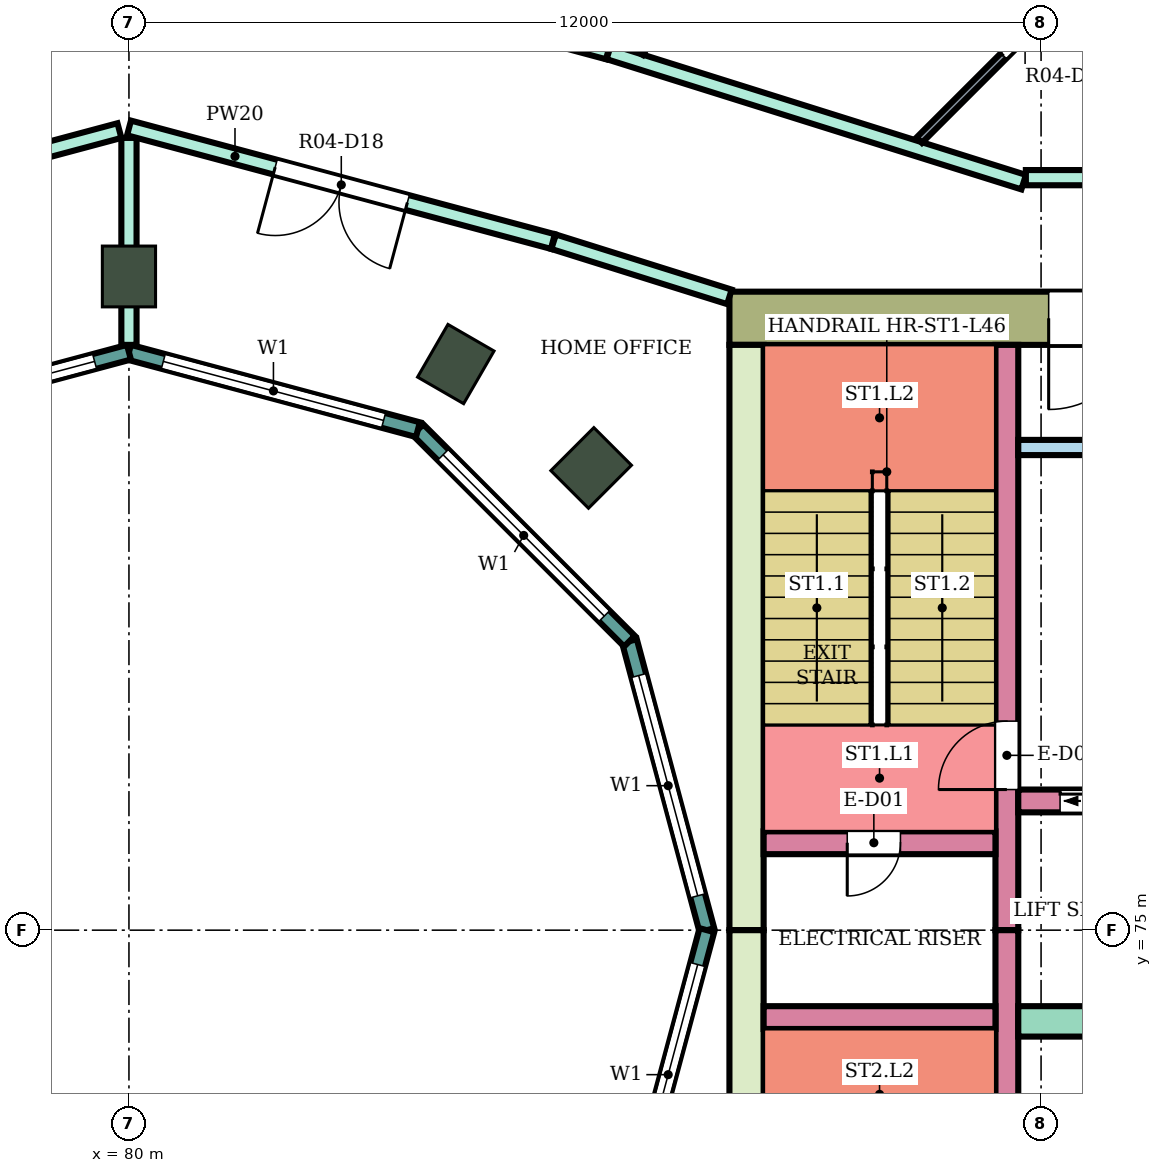
"""IFC4 building model, lengths in metres.
Left out: names, types, materials, properties, quantities, classifications, styles, units other than length and angle.
Written with IfcOpenShell. Run it as: python <this file> out.ifc"""

import sys

from ifc_helpers import new_model, si_unit, direction, frame, frame_2d, origin, origin_2d, place, context, subcontext, project, spatial, rectangle, extrude, element, fill, save


model = new_model("IFC4")
c1 = context("Model", 3, precision=1e-05, world=origin(), true_north=direction((0.0, 1.0)))
c2 = subcontext(c1, "Body", "Model", "MODEL_VIEW")
j1 = project(units=[si_unit("LENGTHUNIT", "METRE"), si_unit("PLANEANGLEUNIT", "RADIAN")], contexts=[c1])
p1 = place(None, origin())
s1 = spatial("IfcSite", under=j1, at=p1, CompositionType="ELEMENT")
p2 = place(p1, origin())
s2 = spatial("IfcBuilding", under=s1, at=p2, CompositionType="ELEMENT")
p3 = place(p2, frame((0.0, 0.0, 198.7)))
s3 = spatial("IfcBuildingStorey", under=s2, at=p3, CompositionType="ELEMENT", Elevation=198.7)
for number, where, z_axis, x_axis in (
    (1, (86.081, 81.081, 0.0), (0.0, 0.0, 1.0), (0.707, 0.707, 0.0)),
    (2, (84.3, 82.448, 0.0), (0.0, 0.0, 1.0), (0.5, 0.866, 0.0)),
    (3, (80.0, 83.6, 0.0), (0.0, 0.0, 1.0), (0.0, 1.0, 0.0)),
):
    element("IfcColumn", number, at=place(p3, frame(where, z_axis=z_axis, x_axis=x_axis)), inside=s3, PredefinedType="COLUMN", context=c2, shape_type="SweptSolid", body=[
        extrude(rectangle(XDim=0.8, YDim=0.7, at=origin_2d()), origin(), (0.0, 0.0, 1.0), 4.1),
    ])
p4 = place(p3, frame((87.9, 83.05, 0.0), z_axis=(0.0, 0.0, 1.0), x_axis=(1.0, 0.0, 0.0)))
e4 = element("IfcWall", 4, at=p4, inside=s3, PredefinedType="SHEAR", context=c2, shape_type="SweptSolid", body=[
    extrude(rectangle(XDim=14.8, YDim=0.7, at=frame_2d((7.4, 0.0))), origin(), (0.0, 0.0, 1.0), 3.78),
])
p5 = place(p4, frame((4.2, 0.0, 0.0)))
e5 = element("IfcOpeningElement", 5, at=p5, cuts=e4, PredefinedType="OPENING", context=c2, shape_type="SweptSolid", body=[
    extrude(rectangle(XDim=2.4, YDim=2.4, at=frame_2d((1.2, 1.2))), frame((0.0, 0.36, 0.0), z_axis=(0.0, -1.0, 0.0), x_axis=(1.0, 0.0, 0.0)), (0.0, 0.0, 1.0), 0.72),
])
for number, where, z_axis, x_axis in (
    (6, (88.125, 75.0, 0.0), (0.0, 0.0, 1.0), (0.0, 1.0, 0.0)),
    (7, (88.125, 67.3, 0.0), (0.0, 0.0, 1.0), (0.0, 1.0, 0.0)),
):
    element("IfcWall", number, at=place(p3, frame(where, z_axis=z_axis, x_axis=x_axis)), inside=s3, PredefinedType="SHEAR", context=c2, shape_type="SweptSolid", body=[
        extrude(rectangle(XDim=7.7, YDim=0.45, at=frame_2d((3.85, 0.0))), origin(), (0.0, 0.0, 1.0), 3.78),
    ])
p6 = place(p3, frame((91.55, 75.0, 0.0), z_axis=(0.0, 0.0, 1.0), x_axis=(0.0, 1.0, 0.0)))
e8 = element("IfcWall", 8, at=p6, inside=s3, PredefinedType="SHEAR", context=c2, shape_type="SweptSolid", body=[
    extrude(rectangle(XDim=7.7, YDim=0.3, at=frame_2d((3.85, 0.0))), origin(), (0.0, 0.0, 1.0), 3.78),
])
p7 = place(p6, frame((1.85, 0.0, 0.0)))
e9 = element("IfcOpeningElement", 9, at=p7, cuts=e8, PredefinedType="OPENING", context=c2, shape_type="SweptSolid", body=[
    extrude(rectangle(XDim=0.9, YDim=2.1, at=frame_2d((0.45, 1.05))), frame((0.0, 0.16, 0.0), z_axis=(0.0, -1.0, 0.0), x_axis=(1.0, 0.0, 0.0)), (0.0, 0.0, 1.0), 0.32),
])
p8 = place(p3, frame((91.55, 67.3, 0.0), z_axis=(0.0, 0.0, 1.0), x_axis=(0.0, 1.0, 0.0)))
e10 = element("IfcWall", 10, at=p8, inside=s3, PredefinedType="SHEAR", context=c2, shape_type="SweptSolid", body=[
    extrude(rectangle(XDim=7.7, YDim=0.3, at=frame_2d((3.85, 0.0))), origin(), (0.0, 0.0, 1.0), 3.78),
])
p9 = place(p8, frame((0.35, 0.0, 0.0)))
e11 = element("IfcOpeningElement", 11, at=p9, cuts=e10, PredefinedType="OPENING", context=c2, shape_type="SweptSolid", body=[
    extrude(rectangle(XDim=0.9, YDim=2.1, at=frame_2d((0.45, 1.05))), frame((0.0, 0.16, 0.0), z_axis=(0.0, -1.0, 0.0), x_axis=(1.0, 0.0, 0.0)), (0.0, 0.0, 1.0), 0.32),
])
p10 = place(p3, frame((88.35, 76.15, 0.0), z_axis=(0.0, 0.0, 1.0), x_axis=(1.0, 0.0, 0.0)))
e12 = element("IfcWall", 12, at=p10, inside=s3, PredefinedType="SHEAR", context=c2, shape_type="SweptSolid", body=[
    extrude(rectangle(XDim=3.05, YDim=0.3, at=frame_2d((1.525, 0.0))), origin(), (0.0, 0.0, 1.0), 3.78),
])
p11 = place(p10, frame((1.1, 0.0, 0.0)))
e13 = element("IfcOpeningElement", 13, at=p11, cuts=e12, PredefinedType="OPENING", context=c2, shape_type="SweptSolid", body=[
    extrude(rectangle(XDim=0.7, YDim=2.0, at=frame_2d((0.35, 1.0))), frame((0.0, 0.16, 0.0), z_axis=(0.0, -1.0, 0.0), x_axis=(1.0, 0.0, 0.0)), (0.0, 0.0, 1.0), 0.32),
])
p12 = place(p3, frame((88.35, 73.85, 0.0), z_axis=(0.0, 0.0, 1.0), x_axis=(1.0, 0.0, 0.0)))
e14 = element("IfcWall", 14, at=p12, inside=s3, PredefinedType="SHEAR", context=c2, shape_type="SweptSolid", body=[
    extrude(rectangle(XDim=3.05, YDim=0.3, at=frame_2d((1.525, 0.0))), origin(), (0.0, 0.0, 1.0), 3.78),
])
p13 = place(p3, frame((91.7, 76.7, 0.0), z_axis=(0.0, 0.0, 1.0), x_axis=(1.0, 0.0, 0.0)))
e15 = element("IfcWall", 15, at=p13, inside=s3, PredefinedType="SHEAR", context=c2, shape_type="SweptSolid", body=[
    extrude(rectangle(XDim=11.0, YDim=0.3, at=frame_2d((5.5, 0.0))), origin(), (0.0, 0.0, 1.0), 3.78),
])
p14 = place(p13, frame((0.55, 0.0, 0.0)))
e16 = element("IfcOpeningElement", 16, at=p14, cuts=e15, PredefinedType="OPENING", context=c2, shape_type="SweptSolid", body=[
    extrude(rectangle(XDim=1.1, YDim=2.1, at=frame_2d((0.55, 1.05))), frame((0.0, 0.16, 0.0), z_axis=(0.0, -1.0, 0.0), x_axis=(1.0, 0.0, 0.0)), (0.0, 0.0, 1.0), 0.32),
])
p15 = place(p13, frame((3.0, 0.0, 0.0)))
e17 = element("IfcOpeningElement", 17, at=p15, cuts=e15, PredefinedType="OPENING", context=c2, shape_type="SweptSolid", body=[
    extrude(rectangle(XDim=1.2, YDim=2.1, at=frame_2d((0.6, 1.05))), frame((0.0, 0.16, 0.0), z_axis=(0.0, -1.0, 0.0), x_axis=(1.0, 0.0, 0.0)), (0.0, 0.0, 1.0), 0.32),
])
p16 = place(p13, frame((5.5, 0.0, 0.0)))
e18 = element("IfcOpeningElement", 18, at=p16, cuts=e15, PredefinedType="OPENING", context=c2, shape_type="SweptSolid", body=[
    extrude(rectangle(XDim=1.2, YDim=2.1, at=frame_2d((0.6, 1.05))), frame((0.0, 0.16, 0.0), z_axis=(0.0, -1.0, 0.0), x_axis=(1.0, 0.0, 0.0)), (0.0, 0.0, 1.0), 0.32),
])
p17 = place(p13, frame((8.8, 0.0, 0.0)))
e19 = element("IfcOpeningElement", 19, at=p17, cuts=e15, PredefinedType="OPENING", context=c2, shape_type="SweptSolid", body=[
    extrude(rectangle(XDim=0.9, YDim=2.1, at=frame_2d((0.45, 1.05))), frame((0.0, 0.16, 0.0), z_axis=(0.0, -1.0, 0.0), x_axis=(1.0, 0.0, 0.0)), (0.0, 0.0, 1.0), 0.32),
])
p18 = place(p3, frame((91.7, 73.8, 0.0), z_axis=(0.0, 0.0, 1.0), x_axis=(1.0, 0.0, 0.0)))
e20 = element("IfcWall", 20, at=p18, inside=s3, PredefinedType="SHEAR", context=c2, shape_type="SweptSolid", body=[
    extrude(rectangle(XDim=11.0, YDim=0.4, at=frame_2d((5.5, 0.0))), origin(), (0.0, 0.0, 1.0), 3.78),
])
p19 = place(p3, frame((91.7, 81.35, 0.0), z_axis=(0.0, 0.0, 1.0), x_axis=(1.0, 0.0, 0.0)))
e21 = element("IfcWall", 21, at=p19, inside=s3, PredefinedType="SHEAR", context=c2, shape_type="SweptSolid", body=[
    extrude(rectangle(XDim=4.5, YDim=0.2, at=frame_2d((2.25, 0.0))), origin(), (0.0, 0.0, 1.0), 3.78),
])
p20 = place(p3, frame((87.604, 75.0, 0.0), z_axis=(0.0, 0.0, 1.0), x_axis=(-0.258789828301, 0.965933654434, 0.0)))
e22 = element("IfcWall", 22, at=p20, inside=s3, PredefinedType="NOTDEFINED", context=c2, shape_type="SweptSolid", body=[
    extrude(rectangle(XDim=3.936, YDim=0.2, at=frame_2d((1.968, 0.0))), origin(), (0.0, 0.0, 1.0), 4.1),
])
p21 = place(p20, frame((0.468, 0.0, 0.9)))
e23 = element("IfcOpeningElement", 23, at=p21, cuts=e22, PredefinedType="OPENING", context=c2, shape_type="SweptSolid", body=[
    extrude(rectangle(XDim=3.0, YDim=2.3, at=frame_2d((1.5, 1.15))), frame((0.0, 0.11, 0.0), z_axis=(0.0, -1.0, 0.0), x_axis=(1.0, 0.0, 0.0)), (0.0, 0.0, 1.0), 0.22),
])
p22 = place(p3, frame((86.585, 78.802, 0.0), z_axis=(0.0, 0.0, 1.0), x_axis=(-0.707106781187, 0.707106781187, 0.0)))
e24 = element("IfcWall", 24, at=p22, inside=s3, PredefinedType="NOTDEFINED", context=c2, shape_type="SweptSolid", body=[
    extrude(rectangle(XDim=3.936, YDim=0.2, at=frame_2d((1.968, 0.0))), origin(), (0.0, 0.0, 1.0), 4.1),
])
p23 = place(p22, frame((0.468, 0.0, 0.9)))
e25 = element("IfcOpeningElement", 25, at=p23, cuts=e24, PredefinedType="OPENING", context=c2, shape_type="SweptSolid", body=[
    extrude(rectangle(XDim=3.0, YDim=2.3, at=frame_2d((1.5, 1.15))), frame((0.0, 0.11, 0.0), z_axis=(0.0, -1.0, 0.0), x_axis=(1.0, 0.0, 0.0)), (0.0, 0.0, 1.0), 0.22),
])
p24 = place(p3, frame((83.802, 81.585, 0.0), z_axis=(0.0, 0.0, 1.0), x_axis=(-0.965933654434, 0.258789828301, 0.0)))
e26 = element("IfcWall", 26, at=p24, inside=s3, PredefinedType="NOTDEFINED", context=c2, shape_type="SweptSolid", body=[
    extrude(rectangle(XDim=3.936, YDim=0.2, at=frame_2d((1.968, 0.0))), origin(), (0.0, 0.0, 1.0), 4.1),
])
p25 = place(p24, frame((0.468, 0.0, 0.9)))
e27 = element("IfcOpeningElement", 27, at=p25, cuts=e26, PredefinedType="OPENING", context=c2, shape_type="SweptSolid", body=[
    extrude(rectangle(XDim=3.0, YDim=2.3, at=frame_2d((1.5, 1.15))), frame((0.0, 0.11, 0.0), z_axis=(0.0, -1.0, 0.0), x_axis=(1.0, 0.0, 0.0)), (0.0, 0.0, 1.0), 0.22),
])
p26 = place(p3, frame((80.0, 82.604, 0.0), z_axis=(0.0, 0.0, 1.0), x_axis=(-0.965933654434, -0.258789828301, 0.0)))
e28 = element("IfcWall", 28, at=p26, inside=s3, PredefinedType="NOTDEFINED", context=c2, shape_type="SweptSolid", body=[
    extrude(rectangle(XDim=3.936, YDim=0.2, at=frame_2d((1.968, 0.0))), origin(), (0.0, 0.0, 1.0), 4.1),
])
p27 = place(p26, frame((0.468, 0.0, 0.9)))
e29 = element("IfcOpeningElement", 29, at=p27, cuts=e28, PredefinedType="OPENING", context=c2, shape_type="SweptSolid", body=[
    extrude(rectangle(XDim=3.0, YDim=2.3, at=frame_2d((1.5, 1.15))), frame((0.0, 0.11, 0.0), z_axis=(0.0, -1.0, 0.0), x_axis=(1.0, 0.0, 0.0)), (0.0, 0.0, 1.0), 0.22),
])
p28 = place(p3, frame((86.585, 71.198, 0.0), z_axis=(0.0, 0.0, 1.0), x_axis=(0.258789828301, 0.965933654434, 0.0)))
e30 = element("IfcWall", 30, at=p28, inside=s3, PredefinedType="NOTDEFINED", context=c2, shape_type="SweptSolid", body=[
    extrude(rectangle(XDim=3.936, YDim=0.2, at=frame_2d((1.968, 0.0))), origin(), (0.0, 0.0, 1.0), 4.1),
])
p29 = place(p28, frame((0.468, 0.0, 0.9)))
e31 = element("IfcOpeningElement", 31, at=p29, cuts=e30, PredefinedType="OPENING", context=c2, shape_type="SweptSolid", body=[
    extrude(rectangle(XDim=3.0, YDim=2.3, at=frame_2d((1.5, 1.15))), frame((0.0, 0.11, 0.0), z_axis=(0.0, -1.0, 0.0), x_axis=(1.0, 0.0, 0.0)), (0.0, 0.0, 1.0), 0.22),
])
p30 = place(p3, frame((73.687, 86.554, 0.0), z_axis=(0.0, 0.0, 1.0), x_axis=(0.96595258731, 0.258719150952, 0.0)))
e32 = element("IfcWall", 32, at=p30, inside=s3, PredefinedType="PARTITIONING", context=c2, shape_type="SweptSolid", body=[
    extrude(rectangle(XDim=6.486, YDim=0.2, at=frame_2d((3.243, 0.0))), origin(), (0.0, 0.0, 1.0), 3.65),
])
p31 = place(p30, frame((0.55, 0.0, 0.0)))
e33 = element("IfcOpeningElement", 33, at=p31, cuts=e32, PredefinedType="OPENING", context=c2, shape_type="SweptSolid", body=[
    extrude(rectangle(XDim=1.0, YDim=2.1, at=frame_2d((0.5, 1.05))), frame((0.0, 0.11, 0.0), z_axis=(0.0, -1.0, 0.0), x_axis=(1.0, 0.0, 0.0)), (0.0, 0.0, 1.0), 0.22),
])
p32 = place(p3, frame((74.413, 84.057, 0.0), z_axis=(0.0, 0.0, 1.0), x_axis=(0.965972135939, 0.258646153246, 0.0)))
e34 = element("IfcWall", 34, at=p32, inside=s3, PredefinedType="PARTITIONING", context=c2, shape_type="SweptSolid", body=[
    extrude(rectangle(XDim=5.654, YDim=0.2, at=frame_2d((2.827, 0.0))), origin(), (0.0, 0.0, 1.0), 3.65),
])
p33 = place(p32, frame((2.593, 0.0, 0.0)))
e35 = element("IfcOpeningElement", 35, at=p33, cuts=e34, PredefinedType="OPENING", context=c2, shape_type="SweptSolid", body=[
    extrude(rectangle(XDim=0.9, YDim=2.1, at=frame_2d((0.45, 1.05))), frame((0.0, 0.11, 0.0), z_axis=(0.0, -1.0, 0.0), x_axis=(1.0, 0.0, 0.0)), (0.0, 0.0, 1.0), 0.22),
])
p34 = place(p3, frame((80.0, 82.7, 0.0), z_axis=(0.0, 0.0, 1.0), x_axis=(0.0, 1.0, 0.0)))
e36 = element("IfcWall", 36, at=p34, inside=s3, PredefinedType="PARTITIONING", context=c2, shape_type="SweptSolid", body=[
    extrude(rectangle(XDim=2.723, YDim=0.2, at=frame_2d((1.362, 0.0))), origin(), (0.0, 0.0, 1.0), 3.65),
])
p35 = place(p3, frame((80.048, 88.233, 0.0), z_axis=(0.0, 0.0, 1.0), x_axis=(0.965787353661, -0.259335280109, 0.0)))
e37 = element("IfcWall", 37, at=p35, inside=s3, PredefinedType="PARTITIONING", context=c2, shape_type="SweptSolid", body=[
    extrude(rectangle(XDim=6.476, YDim=0.2, at=frame_2d((3.238, 0.0))), origin(), (0.0, 0.0, 1.0), 3.65),
])
p36 = place(p35, frame((4.936, 0.0, 0.0)))
e38 = element("IfcOpeningElement", 38, at=p36, cuts=e37, PredefinedType="OPENING", context=c2, shape_type="SweptSolid", body=[
    extrude(rectangle(XDim=1.0, YDim=2.1, at=frame_2d((0.5, 1.05))), frame((0.0, 0.11, 0.0), z_axis=(0.0, -1.0, 0.0), x_axis=(1.0, 0.0, 0.0)), (0.0, 0.0, 1.0), 0.22),
])
p37 = place(p3, frame((80.001, 85.554, 0.0), z_axis=(0.0, 0.0, 1.0), x_axis=(0.965917658836, -0.258849524528, 0.0)))
e39 = element("IfcWall", 39, at=p37, inside=s3, PredefinedType="PARTITIONING", context=c2, shape_type="SweptSolid", body=[
    extrude(rectangle(XDim=5.773, YDim=0.2, at=frame_2d((2.887, 0.0))), origin(), (0.0, 0.0, 1.0), 3.65),
])
p38 = place(p37, frame((1.991, 0.0, 0.0)))
e40 = element("IfcOpeningElement", 40, at=p38, cuts=e39, PredefinedType="OPENING", context=c2, shape_type="SweptSolid", body=[
    extrude(rectangle(XDim=1.8, YDim=2.1, at=frame_2d((0.9, 1.05))), frame((0.0, 0.11, 0.0), z_axis=(0.0, -1.0, 0.0), x_axis=(1.0, 0.0, 0.0)), (0.0, 0.0, 1.0), 0.22),
])
p39 = place(p3, frame((85.587, 84.057, 0.0), z_axis=(0.0, 0.0, 1.0), x_axis=(0.954210767728, -0.299135104513, 0.0)))
e41 = element("IfcWall", 41, at=p39, inside=s3, PredefinedType="PARTITIONING", context=c2, shape_type="SweptSolid", body=[
    extrude(rectangle(XDim=2.424, YDim=0.2, at=frame_2d((1.212, 0.0))), origin(), (0.0, 0.0, 1.0), 3.65),
])
p40 = place(p3, frame((86.313, 86.554, 0.0), z_axis=(0.0, 0.0, 1.0), x_axis=(0.954081217458, -0.299548043717, 0.0)))
e42 = element("IfcWall", 42, at=p40, inside=s3, PredefinedType="PARTITIONING", context=c2, shape_type="SweptSolid", body=[
    extrude(rectangle(XDim=5.721, YDim=0.2, at=frame_2d((2.86, 0.0))), origin(), (0.0, 0.0, 1.0), 3.65),
])
p41 = place(p3, frame((86.676, 86.563, 0.0), z_axis=(0.0, 0.0, 1.0), x_axis=(0.500124310661, 0.865953621094, 0.0)))
e43 = element("IfcWall", 43, at=p41, inside=s3, PredefinedType="PARTITIONING", context=c2, shape_type="SweptSolid", body=[
    extrude(rectangle(XDim=12.446, YDim=0.2, at=frame_2d((6.223, 0.0))), origin(), (0.0, 0.0, 1.0), 3.65),
])
p42 = place(p3, frame((91.8, 84.9, 0.0), z_axis=(0.0, 0.0, 1.0), x_axis=(1.0, 0.0, 0.0)))
e44 = element("IfcWall", 44, at=p42, inside=s3, PredefinedType="PARTITIONING", context=c2, shape_type="SweptSolid", body=[
    extrude(rectangle(XDim=3.0, YDim=0.2, at=frame_2d((1.5, 0.0))), origin(), (0.0, 0.0, 1.0), 3.65),
])
p43 = place(p42, frame((1.45, 0.0, 0.0)))
e45 = element("IfcOpeningElement", 45, at=p43, cuts=e44, PredefinedType="OPENING", context=c2, shape_type="SweptSolid", body=[
    extrude(rectangle(XDim=1.0, YDim=2.1, at=frame_2d((0.5, 1.05))), frame((0.0, 0.11, 0.0), z_axis=(0.0, -1.0, 0.0), x_axis=(1.0, 0.0, 0.0)), (0.0, 0.0, 1.0), 0.22),
])
p44 = place(p3, frame((90.397, 85.393, 0.0), z_axis=(0.0, 0.0, 1.0), x_axis=(0.707264750546, 0.706948776529, 0.0)))
e46 = element("IfcWall", 46, at=p44, inside=s3, PredefinedType="PARTITIONING", context=c2, shape_type="SweptSolid", body=[
    extrude(rectangle(XDim=8.499, YDim=0.1, at=frame_2d((4.25, 0.0))), origin(), (0.0, 0.0, 1.0), 3.65),
])
p45 = place(p44, frame((5.857, 0.0, 0.0)))
e47 = element("IfcOpeningElement", 47, at=p45, cuts=e46, PredefinedType="OPENING", context=c2, shape_type="SweptSolid", body=[
    extrude(rectangle(XDim=0.9, YDim=2.1, at=frame_2d((0.45, 1.05))), frame((0.0, 0.06, 0.0), z_axis=(0.0, -1.0, 0.0), x_axis=(1.0, 0.0, 0.0)), (0.0, 0.0, 1.0), 0.12),
])
p46 = place(p44, frame((1.569, 0.0, 0.0)))
e48 = element("IfcOpeningElement", 48, at=p46, cuts=e46, PredefinedType="OPENING", context=c2, shape_type="SweptSolid", body=[
    extrude(rectangle(XDim=0.8, YDim=2.1, at=frame_2d((0.4, 1.05))), frame((0.0, 0.06, 0.0), z_axis=(0.0, -1.0, 0.0), x_axis=(1.0, 0.0, 0.0)), (0.0, 0.0, 1.0), 0.12),
])
p47 = place(p21, origin())
e49 = element("IfcWindow", 49, at=p47, inside=s3, PartitioningType="SINGLE_PANEL", PredefinedType="WINDOW", context=c2, shape_type="SweptSolid", body=[
    extrude(rectangle(XDim=3.0, YDim=2.3, at=frame_2d((1.5, 1.15))), frame((0.0, 0.03, 0.0), z_axis=(0.0, -1.0, 0.0), x_axis=(1.0, 0.0, 0.0)), (0.0, 0.0, 1.0), 0.06),
])
fill(e23, e49)
p48 = place(p23, origin())
e50 = element("IfcWindow", 50, at=p48, inside=s3, PartitioningType="SINGLE_PANEL", PredefinedType="WINDOW", context=c2, shape_type="SweptSolid", body=[
    extrude(rectangle(XDim=3.0, YDim=2.3, at=frame_2d((1.5, 1.15))), frame((0.0, 0.03, 0.0), z_axis=(0.0, -1.0, 0.0), x_axis=(1.0, 0.0, 0.0)), (0.0, 0.0, 1.0), 0.06),
])
fill(e25, e50)
p49 = place(p25, origin())
e51 = element("IfcWindow", 51, at=p49, inside=s3, PartitioningType="SINGLE_PANEL", PredefinedType="WINDOW", context=c2, shape_type="SweptSolid", body=[
    extrude(rectangle(XDim=3.0, YDim=2.3, at=frame_2d((1.5, 1.15))), frame((0.0, 0.03, 0.0), z_axis=(0.0, -1.0, 0.0), x_axis=(1.0, 0.0, 0.0)), (0.0, 0.0, 1.0), 0.06),
])
fill(e27, e51)
p50 = place(p27, origin())
e52 = element("IfcWindow", 52, at=p50, inside=s3, PartitioningType="SINGLE_PANEL", PredefinedType="WINDOW", context=c2, shape_type="SweptSolid", body=[
    extrude(rectangle(XDim=3.0, YDim=2.3, at=frame_2d((1.5, 1.15))), frame((0.0, 0.03, 0.0), z_axis=(0.0, -1.0, 0.0), x_axis=(1.0, 0.0, 0.0)), (0.0, 0.0, 1.0), 0.06),
])
fill(e29, e52)
p51 = place(p29, origin())
e53 = element("IfcWindow", 53, at=p51, inside=s3, PartitioningType="SINGLE_PANEL", PredefinedType="WINDOW", context=c2, shape_type="SweptSolid", body=[
    extrude(rectangle(XDim=3.0, YDim=2.3, at=frame_2d((1.5, 1.15))), frame((0.0, 0.03, 0.0), z_axis=(0.0, -1.0, 0.0), x_axis=(1.0, 0.0, 0.0)), (0.0, 0.0, 1.0), 0.06),
])
fill(e31, e53)
p52 = place(p46, origin())
e54 = element("IfcDoor", 54, at=p52, inside=s3, OperationType="SINGLE_SWING_LEFT", PredefinedType="DOOR", context=c2, shape_type="SweptSolid", body=[
    extrude(rectangle(XDim=0.8, YDim=2.1, at=frame_2d((0.4, 1.05))), frame((0.0, 0.025, 0.0), z_axis=(0.0, -1.0, 0.0), x_axis=(1.0, 0.0, 0.0)), (0.0, 0.0, 1.0), 0.05),
])
fill(e48, e54)
p53 = place(p38, frame((1.8, 0.0, 0.0), z_axis=(0.0, 0.0, 1.0), x_axis=(-1.0, 0.0, 0.0)))
e55 = element("IfcDoor", 55, at=p53, inside=s3, OperationType="DOUBLE_DOOR_SINGLE_SWING", PredefinedType="DOOR", context=c2, shape_type="SweptSolid", body=[
    extrude(rectangle(XDim=1.8, YDim=2.1, at=frame_2d((0.9, 1.05))), frame((0.0, 0.025, 0.0), z_axis=(0.0, -1.0, 0.0), x_axis=(1.0, 0.0, 0.0)), (0.0, 0.0, 1.0), 0.05),
])
fill(e40, e55)
p54 = place(p11, frame((0.7, 0.0, 0.0), z_axis=(0.0, 0.0, 1.0), x_axis=(-1.0, 0.0, 0.0)))
e56 = element("IfcDoor", 56, at=p54, inside=s3, OperationType="SINGLE_SWING_RIGHT", PredefinedType="DOOR", context=c2, shape_type="SweptSolid", body=[
    extrude(rectangle(XDim=0.7, YDim=2.0, at=frame_2d((0.35, 1.0))), frame((0.0, 0.025, 0.0), z_axis=(0.0, -1.0, 0.0), x_axis=(1.0, 0.0, 0.0)), (0.0, 0.0, 1.0), 0.05),
])
fill(e13, e56)
p55 = place(p7, origin())
e57 = element("IfcDoor", 57, at=p55, inside=s3, OperationType="SINGLE_SWING_LEFT", PredefinedType="DOOR", context=c2, shape_type="SweptSolid", body=[
    extrude(rectangle(XDim=0.9, YDim=2.1, at=frame_2d((0.45, 1.05))), frame((0.0, 0.025, 0.0), z_axis=(0.0, -1.0, 0.0), x_axis=(1.0, 0.0, 0.0)), (0.0, 0.0, 1.0), 0.05),
])
fill(e9, e57)
p56 = place(p14, origin())
e58 = element("IfcDoor", 58, at=p56, inside=s3, OperationType="DOUBLE_DOOR_SLIDING", PredefinedType="DOOR", context=c2, shape_type="SweptSolid", body=[
    extrude(rectangle(XDim=1.1, YDim=2.1, at=frame_2d((0.55, 1.05))), frame((0.0, 0.025, 0.0), z_axis=(0.0, -1.0, 0.0), x_axis=(1.0, 0.0, 0.0)), (0.0, 0.0, 1.0), 0.05),
])
fill(e16, e58)
p57 = place(p5, frame((2.4, 0.0, 0.0), z_axis=(0.0, 0.0, 1.0), x_axis=(-1.0, 0.0, 0.0)))
e59 = element("IfcDoor", 59, at=p57, inside=s3, OperationType="DOUBLE_DOOR_SINGLE_SWING", PredefinedType="DOOR", context=c2, shape_type="SweptSolid", body=[
    extrude(rectangle(XDim=2.4, YDim=2.4, at=frame_2d((1.2, 1.2))), frame((0.0, 0.025, 0.0), z_axis=(0.0, -1.0, 0.0), x_axis=(1.0, 0.0, 0.0)), (0.0, 0.0, 1.0), 0.05),
])
fill(e5, e59)
save(model, sys.argv[1])
